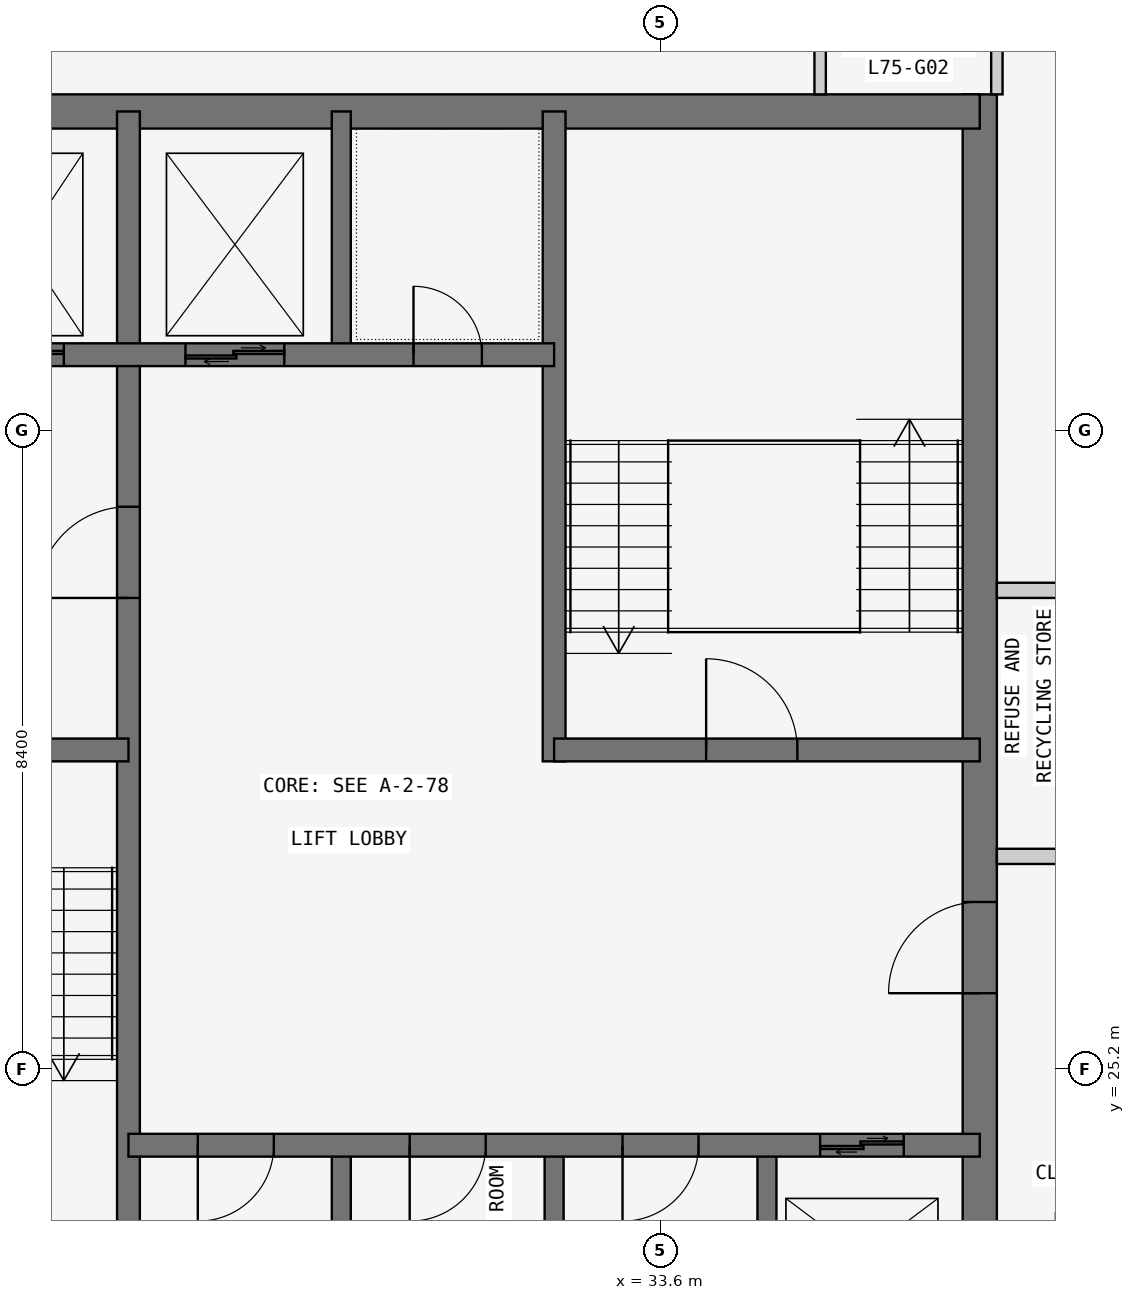
"""IFC4 building model, lengths in metres.
Left out: names, types, materials, properties, quantities, classifications, styles, units other than length and angle.
Written with IfcOpenShell. Run it as: python <this file> out.ifc"""

import sys

from ifc_helpers import new_model, si_unit, direction, frame, frame_2d, origin, place, context, subcontext, project, spatial, rectangle, extrude, element, fill, save


model = new_model("IFC4")
c1 = context("Model", 3, precision=1e-05, world=origin(), true_north=direction((0.0, 1.0)))
c2 = subcontext(c1, "Body", "Model", "MODEL_VIEW")
j1 = project(units=[si_unit("LENGTHUNIT", "METRE"), si_unit("PLANEANGLEUNIT", "RADIAN")], contexts=[c1])
p1 = place(None, origin())
s1 = spatial("IfcSite", under=j1, at=p1, CompositionType="ELEMENT")
p2 = place(p1, origin())
s2 = spatial("IfcBuilding", under=s1, at=p2, CompositionType="ELEMENT")
p3 = place(p2, frame((0.0, 0.0, 286.5)))
s3 = spatial("IfcBuildingStorey", under=s2, at=p3, CompositionType="ELEMENT", Elevation=286.5)
p4 = place(p3, frame((37.8, 21.0, 0.0), z_axis=(0.0, 0.0, 1.0), x_axis=(0.0, 1.0, 0.0)))
e1 = element("IfcWall", 1, at=p4, inside=s3, PredefinedType="SHEAR", context=c2, shape_type="SweptSolid", body=[
    extrude(rectangle(XDim=17.025, YDim=0.45, at=frame_2d((8.512, 0.0))), origin(), (0.0, 0.0, 1.0), 3.6),
])
p5 = place(p4, frame((5.2, 0.0, 0.0)))
e2 = element("IfcOpeningElement", 2, at=p5, cuts=e1, PredefinedType="OPENING", context=c2, shape_type="SweptSolid", body=[
    extrude(rectangle(XDim=1.2, YDim=2.1, at=frame_2d((0.6, 1.05))), frame((0.0, 0.235, 0.0), z_axis=(0.0, -1.0, 0.0), x_axis=(1.0, 0.0, 0.0)), (0.0, 0.0, 1.0), 0.47),
])
p6 = place(p3, frame((37.8, 37.8, 0.0), z_axis=(0.0, 0.0, 1.0), x_axis=(-1.0, 0.0, 0.0)))
e3 = element("IfcWall", 3, at=p6, inside=s3, PredefinedType="SHEAR", context=c2, shape_type="SweptSolid", body=[
    extrude(rectangle(XDim=17.025, YDim=0.45, at=frame_2d((8.513, 0.0))), origin(), (0.0, 0.0, 1.0), 3.6),
])
p7 = place(p3, frame((26.6, 21.0, 0.0), z_axis=(0.0, 0.0, 1.0), x_axis=(0.0, 1.0, 0.0)))
e4 = element("IfcWall", 4, at=p7, inside=s3, PredefinedType="SHEAR", context=c2, shape_type="SweptSolid", body=[
    extrude(rectangle(XDim=16.8, YDim=0.3, at=frame_2d((8.4, 0.0))), origin(), (0.0, 0.0, 1.0), 3.6),
])
p8 = place(p7, frame((10.4, 0.0, 0.0)))
e5 = element("IfcOpeningElement", 5, at=p8, cuts=e4, PredefinedType="OPENING", context=c2, shape_type="SweptSolid", body=[
    extrude(rectangle(XDim=1.2, YDim=2.1, at=frame_2d((0.6, 1.05))), frame((0.0, 0.16, 0.0), z_axis=(0.0, -1.0, 0.0), x_axis=(1.0, 0.0, 0.0)), (0.0, 0.0, 1.0), 0.32),
])
p9 = place(p3, frame((21.0, 29.4, 0.0), z_axis=(0.0, 0.0, 1.0), x_axis=(1.0, 0.0, 0.0)))
e6 = element("IfcWall", 6, at=p9, inside=s3, PredefinedType="SHEAR", context=c2, shape_type="SweptSolid", body=[
    extrude(rectangle(XDim=5.6, YDim=0.3, at=frame_2d((2.8, 0.0))), origin(), (0.0, 0.0, 1.0), 3.6),
])
p10 = place(p9, frame((2.3, 0.0, 0.0)))
e7 = element("IfcOpeningElement", 7, at=p10, cuts=e6, PredefinedType="OPENING", context=c2, shape_type="SweptSolid", body=[
    extrude(rectangle(XDim=1.2, YDim=2.1, at=frame_2d((0.6, 1.05))), frame((0.0, 0.16, 0.0), z_axis=(0.0, -1.0, 0.0), x_axis=(1.0, 0.0, 0.0)), (0.0, 0.0, 1.0), 0.32),
])
p11 = place(p3, frame((21.0, 34.6, 0.0), z_axis=(0.0, 0.0, 1.0), x_axis=(1.0, 0.0, 0.0)))
e8 = element("IfcWall", 8, at=p11, inside=s3, PredefinedType="SHEAR", context=c2, shape_type="SweptSolid", body=[
    extrude(rectangle(XDim=11.2, YDim=0.3, at=frame_2d((5.6, 0.0))), origin(), (0.0, 0.0, 1.0), 3.6),
])
p12 = place(p11, frame((9.35, 0.0, 0.0)))
e9 = element("IfcOpeningElement", 9, at=p12, cuts=e8, PredefinedType="OPENING", context=c2, shape_type="SweptSolid", body=[
    extrude(rectangle(XDim=0.9, YDim=2.1, at=frame_2d((0.45, 1.05))), frame((0.0, 0.16, 0.0), z_axis=(0.0, -1.0, 0.0), x_axis=(1.0, 0.0, 0.0)), (0.0, 0.0, 1.0), 0.32),
])
p13 = place(p11, frame((1.0, 0.0, 0.0)))
e10 = element("IfcOpeningElement", 10, at=p13, cuts=e8, PredefinedType="OPENING", context=c2, shape_type="SweptSolid", body=[
    extrude(rectangle(XDim=1.1, YDim=2.1, at=frame_2d((0.55, 1.05))), frame((0.0, 0.16, 0.0), z_axis=(0.0, -1.0, 0.0), x_axis=(1.0, 0.0, 0.0)), (0.0, 0.0, 1.0), 0.32),
])
p14 = place(p11, frame((3.65, 0.0, 0.0)))
e11 = element("IfcOpeningElement", 11, at=p14, cuts=e8, PredefinedType="OPENING", context=c2, shape_type="SweptSolid", body=[
    extrude(rectangle(XDim=1.1, YDim=2.1, at=frame_2d((0.55, 1.05))), frame((0.0, 0.16, 0.0), z_axis=(0.0, -1.0, 0.0), x_axis=(1.0, 0.0, 0.0)), (0.0, 0.0, 1.0), 0.32),
])
p15 = place(p11, frame((6.35, 0.0, 0.0)))
e12 = element("IfcOpeningElement", 12, at=p15, cuts=e8, PredefinedType="OPENING", context=c2, shape_type="SweptSolid", body=[
    extrude(rectangle(XDim=1.3, YDim=2.1, at=frame_2d((0.65, 1.05))), frame((0.0, 0.16, 0.0), z_axis=(0.0, -1.0, 0.0), x_axis=(1.0, 0.0, 0.0)), (0.0, 0.0, 1.0), 0.32),
])
p16 = place(p3, frame((26.6, 24.2, 0.0), z_axis=(0.0, 0.0, 1.0), x_axis=(1.0, 0.0, 0.0)))
e13 = element("IfcWall", 13, at=p16, inside=s3, PredefinedType="SHEAR", context=c2, shape_type="SweptSolid", body=[
    extrude(rectangle(XDim=11.2, YDim=0.3, at=frame_2d((5.6, 0.0))), origin(), (0.0, 0.0, 1.0), 3.6),
])
p17 = place(p16, frame((0.913, 0.0, 0.0)))
e14 = element("IfcOpeningElement", 14, at=p17, cuts=e13, PredefinedType="OPENING", context=c2, shape_type="SweptSolid", body=[
    extrude(rectangle(XDim=1.0, YDim=2.1, at=frame_2d((0.5, 1.05))), frame((0.0, 0.16, 0.0), z_axis=(0.0, -1.0, 0.0), x_axis=(1.0, 0.0, 0.0)), (0.0, 0.0, 1.0), 0.32),
])
p18 = place(p16, frame((3.7, 0.0, 0.0)))
e15 = element("IfcOpeningElement", 15, at=p18, cuts=e13, PredefinedType="OPENING", context=c2, shape_type="SweptSolid", body=[
    extrude(rectangle(XDim=1.0, YDim=2.1, at=frame_2d((0.5, 1.05))), frame((0.0, 0.16, 0.0), z_axis=(0.0, -1.0, 0.0), x_axis=(1.0, 0.0, 0.0)), (0.0, 0.0, 1.0), 0.32),
])
p19 = place(p16, frame((6.5, 0.0, 0.0)))
e16 = element("IfcOpeningElement", 16, at=p19, cuts=e13, PredefinedType="OPENING", context=c2, shape_type="SweptSolid", body=[
    extrude(rectangle(XDim=1.0, YDim=2.1, at=frame_2d((0.5, 1.05))), frame((0.0, 0.16, 0.0), z_axis=(0.0, -1.0, 0.0), x_axis=(1.0, 0.0, 0.0)), (0.0, 0.0, 1.0), 0.32),
])
p20 = place(p16, frame((9.1, 0.0, 0.0)))
e17 = element("IfcOpeningElement", 17, at=p20, cuts=e13, PredefinedType="OPENING", context=c2, shape_type="SweptSolid", body=[
    extrude(rectangle(XDim=1.1, YDim=2.1, at=frame_2d((0.55, 1.05))), frame((0.0, 0.16, 0.0), z_axis=(0.0, -1.0, 0.0), x_axis=(1.0, 0.0, 0.0)), (0.0, 0.0, 1.0), 0.32),
])
p21 = place(p3, frame((32.2, 29.25, 0.0), z_axis=(0.0, 0.0, 1.0), x_axis=(0.0, 1.0, 0.0)))
e18 = element("IfcWall", 18, at=p21, inside=s3, PredefinedType="SHEAR", context=c2, shape_type="SweptSolid", body=[
    extrude(rectangle(XDim=8.55, YDim=0.3, at=frame_2d((4.275, 0.0))), origin(), (0.0, 0.0, 1.0), 3.6),
])
p22 = place(p3, frame((32.2, 29.4, 0.0), z_axis=(0.0, 0.0, 1.0), x_axis=(1.0, 0.0, 0.0)))
e19 = element("IfcWall", 19, at=p22, inside=s3, PredefinedType="SHEAR", context=c2, shape_type="SweptSolid", body=[
    extrude(rectangle(XDim=5.6, YDim=0.3, at=frame_2d((2.8, 0.0))), origin(), (0.0, 0.0, 1.0), 3.6),
])
p23 = place(p22, frame((2.0, 0.0, 0.0)))
e20 = element("IfcOpeningElement", 20, at=p23, cuts=e19, PredefinedType="OPENING", context=c2, shape_type="SweptSolid", body=[
    extrude(rectangle(XDim=1.2, YDim=2.1, at=frame_2d((0.6, 1.05))), frame((0.0, 0.16, 0.0), z_axis=(0.0, -1.0, 0.0), x_axis=(1.0, 0.0, 0.0)), (0.0, 0.0, 1.0), 0.32),
])
for number, where, z_axis, x_axis in (
    (21, (29.4, 21.0, 0.0), (0.0, 0.0, 1.0), (0.0, 1.0, 0.0)),
    (22, (32.2, 21.0, 0.0), (0.0, 0.0, 1.0), (0.0, 1.0, 0.0)),
    (23, (35.0, 21.0, 0.0), (0.0, 0.0, 1.0), (0.0, 1.0, 0.0)),
    (24, (29.4, 34.6, 0.0), (0.0, 0.0, 1.0), (0.0, 1.0, 0.0)),
):
    element("IfcWall", number, at=place(p3, frame(where, z_axis=z_axis, x_axis=x_axis)), inside=s3, PredefinedType="SHEAR", context=c2, shape_type="SweptSolid", body=[
        extrude(rectangle(XDim=3.2, YDim=0.25, at=frame_2d((1.6, 0.0))), origin(), (0.0, 0.0, 1.0), 3.6),
    ])
for number, where, z_axis, x_axis in (
    (25, (38.025, 38.025, 0.0), (0.0, 0.0, 1.0), (0.0, 1.0, 0.0)),
    (26, (35.7, 40.25, 0.0), (0.0, 0.0, 1.0), (0.0, -1.0, 0.0)),
):
    element("IfcWall", number, at=place(p3, frame(where, z_axis=z_axis, x_axis=x_axis)), inside=s3, PredefinedType="PARTITIONING", context=c2, shape_type="SweptSolid", body=[
        extrude(rectangle(XDim=2.225, YDim=0.15, at=frame_2d((1.113, 0.0))), origin(), (0.0, 0.0, 1.0), 3.45),
    ])
for number, where, z_axis, x_axis in (
    (27, (38.025, 28.0, 0.0), (0.0, 0.0, 1.0), (1.0, 0.0, 0.0)),
    (28, (40.6, 31.5, 0.0), (0.0, 0.0, 1.0), (-1.0, 0.0, 0.0)),
):
    element("IfcWall", number, at=place(p3, frame(where, z_axis=z_axis, x_axis=x_axis)), inside=s3, PredefinedType="PARTITIONING", context=c2, shape_type="SweptSolid", body=[
        extrude(rectangle(XDim=2.575, YDim=0.2, at=frame_2d((1.288, 0.0))), origin(), (0.0, 0.0, 1.0), 3.45),
    ])
p24 = place(p8, origin())
e29 = element("IfcDoor", 29, at=p24, inside=s3, OperationType="SINGLE_SWING_LEFT", PredefinedType="DOOR", context=c2, shape_type="SweptSolid", body=[
    extrude(rectangle(XDim=1.2, YDim=2.1, at=frame_2d((0.6, 1.05))), frame((0.0, 0.025, 0.0), z_axis=(0.0, -1.0, 0.0), x_axis=(1.0, 0.0, 0.0)), (0.0, 0.0, 1.0), 0.05),
])
fill(e5, e29)
p25 = place(p5, origin())
e30 = element("IfcDoor", 30, at=p25, inside=s3, OperationType="SINGLE_SWING_LEFT", PredefinedType="DOOR", context=c2, shape_type="SweptSolid", body=[
    extrude(rectangle(XDim=1.2, YDim=2.1, at=frame_2d((0.6, 1.05))), frame((0.0, 0.025, 0.0), z_axis=(0.0, -1.0, 0.0), x_axis=(1.0, 0.0, 0.0)), (0.0, 0.0, 1.0), 0.05),
])
fill(e2, e30)
p26 = place(p23, origin())
e31 = element("IfcDoor", 31, at=p26, inside=s3, OperationType="SINGLE_SWING_LEFT", PredefinedType="DOOR", context=c2, shape_type="SweptSolid", body=[
    extrude(rectangle(XDim=1.2, YDim=2.1, at=frame_2d((0.6, 1.05))), frame((0.0, 0.025, 0.0), z_axis=(0.0, -1.0, 0.0), x_axis=(1.0, 0.0, 0.0)), (0.0, 0.0, 1.0), 0.05),
])
fill(e20, e31)
p27 = place(p12, origin())
e32 = element("IfcDoor", 32, at=p27, inside=s3, OperationType="SINGLE_SWING_LEFT", PredefinedType="DOOR", context=c2, shape_type="SweptSolid", body=[
    extrude(rectangle(XDim=0.9, YDim=2.1, at=frame_2d((0.45, 1.05))), frame((0.0, 0.025, 0.0), z_axis=(0.0, -1.0, 0.0), x_axis=(1.0, 0.0, 0.0)), (0.0, 0.0, 1.0), 0.05),
])
fill(e9, e32)
p28 = place(p17, frame((1.0, 0.0, 0.0), z_axis=(0.0, 0.0, 1.0), x_axis=(-1.0, 0.0, 0.0)))
e33 = element("IfcDoor", 33, at=p28, inside=s3, OperationType="SINGLE_SWING_RIGHT", PredefinedType="DOOR", context=c2, shape_type="SweptSolid", body=[
    extrude(rectangle(XDim=1.0, YDim=2.1, at=frame_2d((0.5, 1.05))), frame((0.0, 0.025, 0.0), z_axis=(0.0, -1.0, 0.0), x_axis=(1.0, 0.0, 0.0)), (0.0, 0.0, 1.0), 0.05),
])
fill(e14, e33)
p29 = place(p18, frame((1.0, 0.0, 0.0), z_axis=(0.0, 0.0, 1.0), x_axis=(-1.0, 0.0, 0.0)))
e34 = element("IfcDoor", 34, at=p29, inside=s3, OperationType="SINGLE_SWING_RIGHT", PredefinedType="DOOR", context=c2, shape_type="SweptSolid", body=[
    extrude(rectangle(XDim=1.0, YDim=2.1, at=frame_2d((0.5, 1.05))), frame((0.0, 0.025, 0.0), z_axis=(0.0, -1.0, 0.0), x_axis=(1.0, 0.0, 0.0)), (0.0, 0.0, 1.0), 0.05),
])
fill(e15, e34)
p30 = place(p19, frame((1.0, 0.0, 0.0), z_axis=(0.0, 0.0, 1.0), x_axis=(-1.0, 0.0, 0.0)))
e35 = element("IfcDoor", 35, at=p30, inside=s3, OperationType="SINGLE_SWING_RIGHT", PredefinedType="DOOR", context=c2, shape_type="SweptSolid", body=[
    extrude(rectangle(XDim=1.0, YDim=2.1, at=frame_2d((0.5, 1.05))), frame((0.0, 0.025, 0.0), z_axis=(0.0, -1.0, 0.0), x_axis=(1.0, 0.0, 0.0)), (0.0, 0.0, 1.0), 0.05),
])
fill(e16, e35)
p31 = place(p20, origin())
e36 = element("IfcDoor", 36, at=p31, inside=s3, OperationType="DOUBLE_DOOR_SLIDING", PredefinedType="DOOR", context=c2, shape_type="SweptSolid", body=[
    extrude(rectangle(XDim=1.1, YDim=2.1, at=frame_2d((0.55, 1.05))), frame((0.0, 0.025, 0.0), z_axis=(0.0, -1.0, 0.0), x_axis=(1.0, 0.0, 0.0)), (0.0, 0.0, 1.0), 0.05),
])
fill(e17, e36)
p32 = place(p14, origin())
e37 = element("IfcDoor", 37, at=p32, inside=s3, OperationType="DOUBLE_DOOR_SLIDING", PredefinedType="DOOR", context=c2, shape_type="SweptSolid", body=[
    extrude(rectangle(XDim=1.1, YDim=2.1, at=frame_2d((0.55, 1.05))), frame((0.0, 0.025, 0.0), z_axis=(0.0, -1.0, 0.0), x_axis=(1.0, 0.0, 0.0)), (0.0, 0.0, 1.0), 0.05),
])
fill(e11, e37)
p33 = place(p15, origin())
e38 = element("IfcDoor", 38, at=p33, inside=s3, OperationType="DOUBLE_DOOR_SLIDING", PredefinedType="DOOR", context=c2, shape_type="SweptSolid", body=[
    extrude(rectangle(XDim=1.3, YDim=2.1, at=frame_2d((0.65, 1.05))), frame((0.0, 0.025, 0.0), z_axis=(0.0, -1.0, 0.0), x_axis=(1.0, 0.0, 0.0)), (0.0, 0.0, 1.0), 0.05),
])
fill(e12, e38)
save(model, sys.argv[1])
